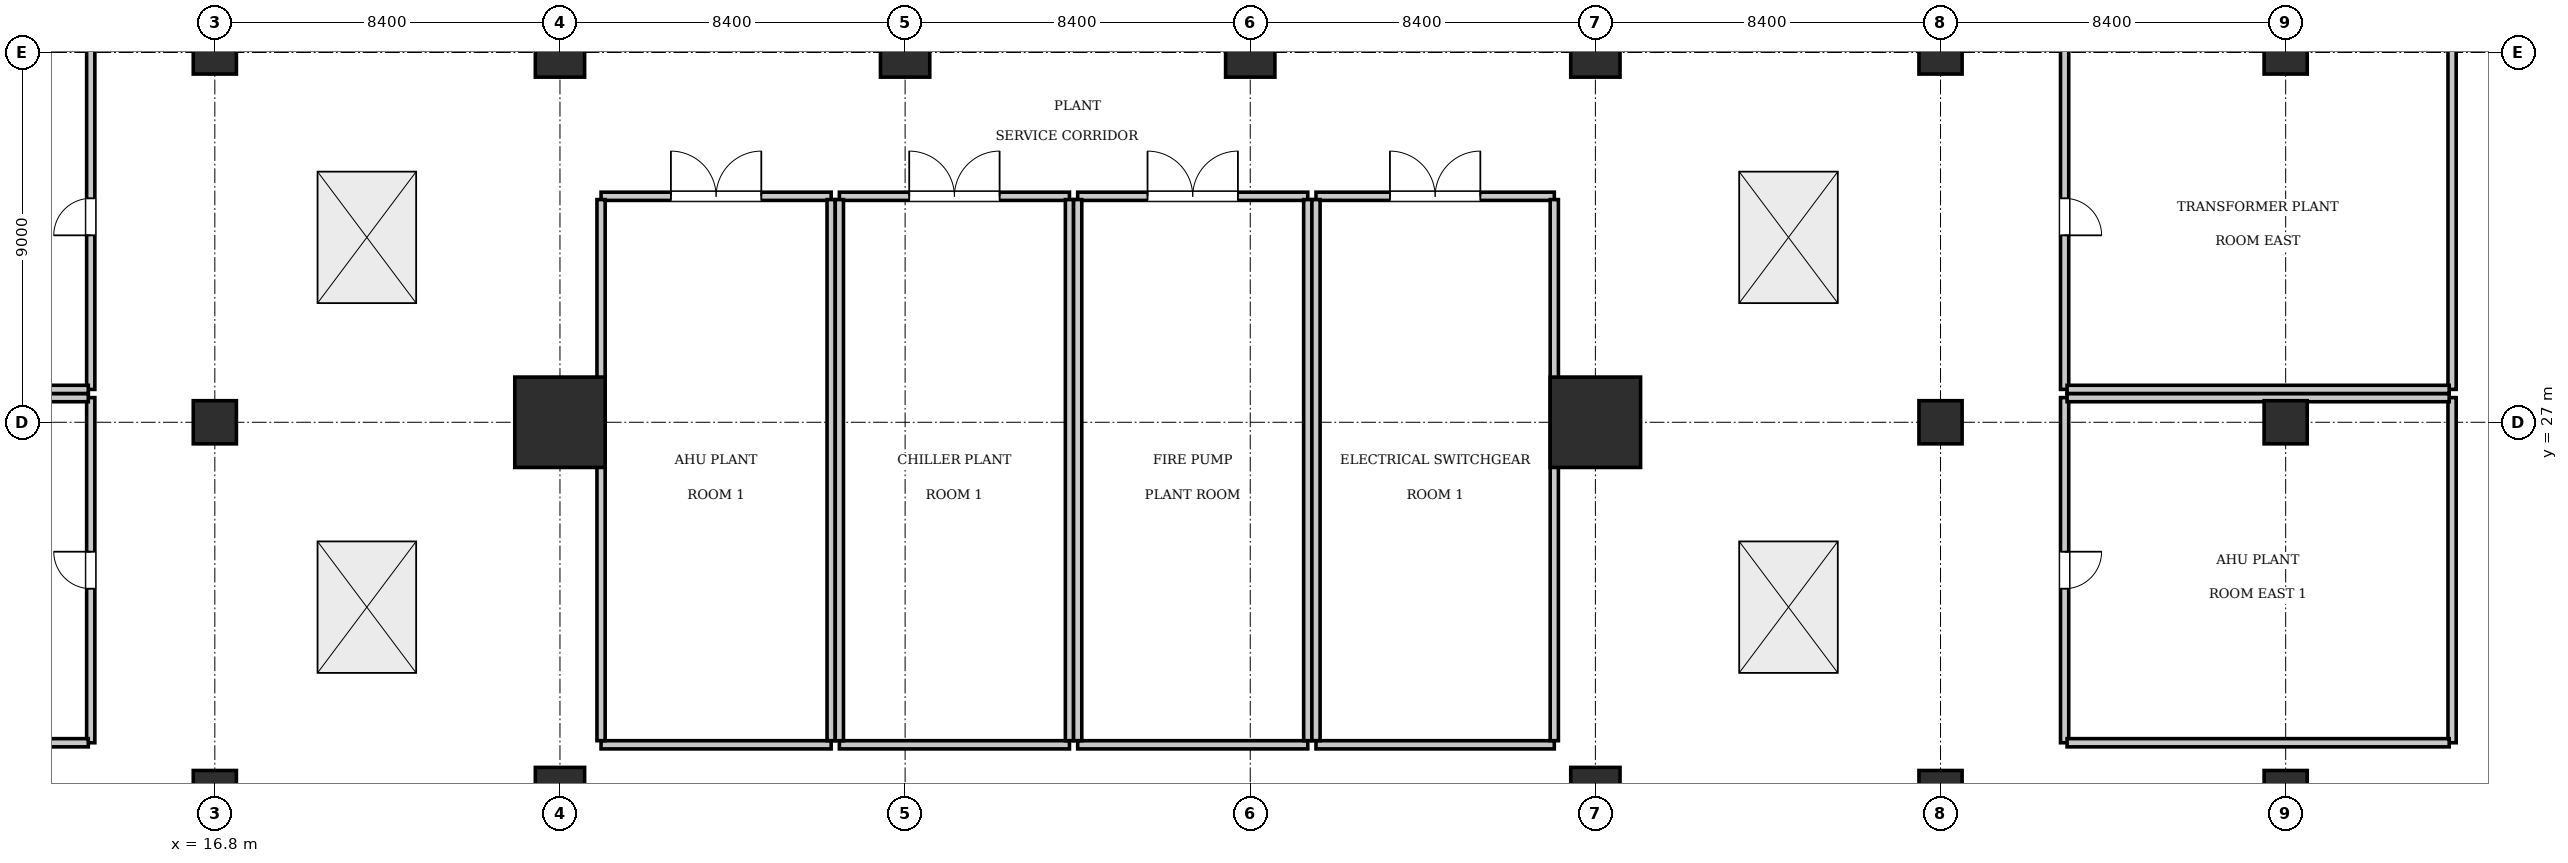
"""IFC4 building model, lengths in metres.
Left out: names, types, materials, properties, quantities, classifications, styles, units other than length and angle.
Written with IfcOpenShell. Run it as: python <this file> out.ifc"""

import sys

from ifc_helpers import new_model, si_unit, direction, frame, frame_2d, origin, origin_2d, place, context, subcontext, project, spatial, rectangle, extrude, element, fill, save


model = new_model("IFC4")
c1 = context("Model", 3, precision=1e-05, world=origin(), true_north=direction((0.0, 1.0)))
c2 = subcontext(c1, "Body", "Model", "MODEL_VIEW")
j1 = project(units=[si_unit("LENGTHUNIT", "METRE"), si_unit("PLANEANGLEUNIT", "RADIAN")], contexts=[c1])
p1 = place(None, origin())
s1 = spatial("IfcSite", under=j1, at=p1, CompositionType="ELEMENT")
p2 = place(p1, origin())
s2 = spatial("IfcBuilding", under=s1, at=p2, CompositionType="ELEMENT")
p3 = place(p2, frame((0.0, 0.0, 21.35)))
s3 = spatial("IfcBuildingStorey", under=s2, at=p3, CompositionType="ELEMENT", Elevation=21.35)
for number, where, z_axis, x_axis in (
    (1, (25.2, 27.0, 0.0), (0.0, 0.0, 1.0), (1.0, 0.0, 0.0)),
    (2, (50.4, 27.0, 0.0), (0.0, 0.0, 1.0), (1.0, 0.0, 0.0)),
):
    element("IfcColumn", number, at=place(p3, frame(where, z_axis=z_axis, x_axis=x_axis)), inside=s3, PredefinedType="COLUMN", context=c2, shape_type="SweptSolid", body=[
        extrude(rectangle(XDim=2.2, YDim=2.2, at=origin_2d()), origin(), (0.0, 0.0, 1.0), 5.6),
    ])
for number, where, z_axis, x_axis in (
    (3, (25.2, 36.0, 0.0), (0.0, 0.0, 1.0), (1.0, 0.0, 0.0)),
    (4, (33.6, 36.0, 0.0), (0.0, 0.0, 1.0), (1.0, 0.0, 0.0)),
    (5, (42.0, 36.0, 0.0), (0.0, 0.0, 1.0), (1.0, 0.0, 0.0)),
    (6, (50.4, 36.0, 0.0), (0.0, 0.0, 1.0), (1.0, 0.0, 0.0)),
    (7, (25.2, 18.0, 0.0), (0.0, 0.0, 1.0), (1.0, 0.0, 0.0)),
    (8, (50.4, 18.0, 0.0), (0.0, 0.0, 1.0), (1.0, 0.0, 0.0)),
):
    element("IfcColumn", number, at=place(p3, frame(where, z_axis=z_axis, x_axis=x_axis)), inside=s3, PredefinedType="COLUMN", context=c2, shape_type="SweptSolid", body=[
        extrude(rectangle(XDim=1.2, YDim=1.2, at=origin_2d()), origin(), (0.0, 0.0, 1.0), 5.6),
    ])
for number, where, z_axis, x_axis in (
    (9, (16.8, 18.0, 0.0), (0.0, 0.0, 1.0), (1.0, 0.0, 0.0)),
    (10, (58.8, 18.0, 0.0), (0.0, 0.0, 1.0), (1.0, 0.0, 0.0)),
    (11, (16.8, 27.0, 0.0), (0.0, 0.0, 1.0), (1.0, 0.0, 0.0)),
    (12, (58.8, 27.0, 0.0), (0.0, 0.0, 1.0), (1.0, 0.0, 0.0)),
    (13, (16.8, 36.0, 0.0), (0.0, 0.0, 1.0), (1.0, 0.0, 0.0)),
    (14, (58.8, 36.0, 0.0), (0.0, 0.0, 1.0), (1.0, 0.0, 0.0)),
    (15, (67.2, 18.0, 0.0), (0.0, 0.0, 1.0), (1.0, 0.0, 0.0)),
    (16, (67.2, 27.0, 0.0), (0.0, 0.0, 1.0), (1.0, 0.0, 0.0)),
    (17, (67.2, 36.0, 0.0), (0.0, 0.0, 1.0), (1.0, 0.0, 0.0)),
):
    element("IfcColumn", number, at=place(p3, frame(where, z_axis=z_axis, x_axis=x_axis)), inside=s3, PredefinedType="COLUMN", context=c2, shape_type="SweptSolid", body=[
        extrude(rectangle(XDim=1.05, YDim=1.05, at=origin_2d()), origin(), (0.0, 0.0, 1.0), 5.6),
    ])
p4 = place(p3, frame((26.2, 32.5, 0.0), z_axis=(0.0, 0.0, 1.0), x_axis=(1.0, 0.0, 0.0)))
e18 = element("IfcWall", 18, at=p4, inside=s3, PredefinedType="PARTITIONING", context=c2, shape_type="SweptSolid", body=[
    extrude(rectangle(XDim=5.6, YDim=0.2, at=frame_2d((2.8, 0.0))), origin(), (0.0, 0.0, 1.0), 5.36),
])
p5 = place(p4, frame((1.7, 0.0, 0.0)))
e19 = element("IfcOpeningElement", 19, at=p5, cuts=e18, PredefinedType="OPENING", context=c2, shape_type="SweptSolid", body=[
    extrude(rectangle(XDim=2.2, YDim=2.4, at=frame_2d((1.1, 1.2))), frame((0.0, 0.11, 0.0), z_axis=(0.0, -1.0, 0.0), x_axis=(1.0, 0.0, 0.0)), (0.0, 0.0, 1.0), 0.22),
])
p6 = place(p3, frame((26.2, 19.15, 0.0), z_axis=(0.0, 0.0, 1.0), x_axis=(1.0, 0.0, 0.0)))
e20 = element("IfcWall", 20, at=p6, inside=s3, PredefinedType="PARTITIONING", context=c2, shape_type="SweptSolid", body=[
    extrude(rectangle(XDim=5.6, YDim=0.2, at=frame_2d((2.8, 0.0))), origin(), (0.0, 0.0, 1.0), 5.36),
])
for number, where, z_axis, x_axis in (
    (21, (26.2, 19.25, 0.0), (0.0, 0.0, 1.0), (0.0, 1.0, 0.0)),
    (22, (31.8, 19.25, 0.0), (0.0, 0.0, 1.0), (0.0, 1.0, 0.0)),
):
    element("IfcWall", number, at=place(p3, frame(where, z_axis=z_axis, x_axis=x_axis)), inside=s3, PredefinedType="PARTITIONING", context=c2, shape_type="SweptSolid", body=[
        extrude(rectangle(XDim=13.17, YDim=0.2, at=frame_2d((6.585, 0.0))), origin(), (0.0, 0.0, 1.0), 5.36),
    ])
p7 = place(p3, frame((32.0, 32.5, 0.0), z_axis=(0.0, 0.0, 1.0), x_axis=(1.0, 0.0, 0.0)))
e23 = element("IfcWall", 23, at=p7, inside=s3, PredefinedType="PARTITIONING", context=c2, shape_type="SweptSolid", body=[
    extrude(rectangle(XDim=5.6, YDim=0.2, at=frame_2d((2.8, 0.0))), origin(), (0.0, 0.0, 1.0), 5.36),
])
p8 = place(p7, frame((1.7, 0.0, 0.0)))
e24 = element("IfcOpeningElement", 24, at=p8, cuts=e23, PredefinedType="OPENING", context=c2, shape_type="SweptSolid", body=[
    extrude(rectangle(XDim=2.2, YDim=2.4, at=frame_2d((1.1, 1.2))), frame((0.0, 0.11, 0.0), z_axis=(0.0, -1.0, 0.0), x_axis=(1.0, 0.0, 0.0)), (0.0, 0.0, 1.0), 0.22),
])
p9 = place(p3, frame((32.0, 19.15, 0.0), z_axis=(0.0, 0.0, 1.0), x_axis=(1.0, 0.0, 0.0)))
e25 = element("IfcWall", 25, at=p9, inside=s3, PredefinedType="PARTITIONING", context=c2, shape_type="SweptSolid", body=[
    extrude(rectangle(XDim=5.6, YDim=0.2, at=frame_2d((2.8, 0.0))), origin(), (0.0, 0.0, 1.0), 5.36),
])
for number, where, z_axis, x_axis in (
    (26, (32.0, 19.25, 0.0), (0.0, 0.0, 1.0), (0.0, 1.0, 0.0)),
    (27, (37.6, 19.25, 0.0), (0.0, 0.0, 1.0), (0.0, 1.0, 0.0)),
):
    element("IfcWall", number, at=place(p3, frame(where, z_axis=z_axis, x_axis=x_axis)), inside=s3, PredefinedType="PARTITIONING", context=c2, shape_type="SweptSolid", body=[
        extrude(rectangle(XDim=13.17, YDim=0.2, at=frame_2d((6.585, 0.0))), origin(), (0.0, 0.0, 1.0), 5.36),
    ])
p10 = place(p3, frame((37.8, 32.5, 0.0), z_axis=(0.0, 0.0, 1.0), x_axis=(1.0, 0.0, 0.0)))
e28 = element("IfcWall", 28, at=p10, inside=s3, PredefinedType="PARTITIONING", context=c2, shape_type="SweptSolid", body=[
    extrude(rectangle(XDim=5.6, YDim=0.2, at=frame_2d((2.8, 0.0))), origin(), (0.0, 0.0, 1.0), 5.36),
])
p11 = place(p10, frame((1.7, 0.0, 0.0)))
e29 = element("IfcOpeningElement", 29, at=p11, cuts=e28, PredefinedType="OPENING", context=c2, shape_type="SweptSolid", body=[
    extrude(rectangle(XDim=2.2, YDim=2.4, at=frame_2d((1.1, 1.2))), frame((0.0, 0.11, 0.0), z_axis=(0.0, -1.0, 0.0), x_axis=(1.0, 0.0, 0.0)), (0.0, 0.0, 1.0), 0.22),
])
p12 = place(p3, frame((37.8, 19.15, 0.0), z_axis=(0.0, 0.0, 1.0), x_axis=(1.0, 0.0, 0.0)))
e30 = element("IfcWall", 30, at=p12, inside=s3, PredefinedType="PARTITIONING", context=c2, shape_type="SweptSolid", body=[
    extrude(rectangle(XDim=5.6, YDim=0.2, at=frame_2d((2.8, 0.0))), origin(), (0.0, 0.0, 1.0), 5.36),
])
for number, where, z_axis, x_axis in (
    (31, (37.8, 19.25, 0.0), (0.0, 0.0, 1.0), (0.0, 1.0, 0.0)),
    (32, (43.4, 19.25, 0.0), (0.0, 0.0, 1.0), (0.0, 1.0, 0.0)),
):
    element("IfcWall", number, at=place(p3, frame(where, z_axis=z_axis, x_axis=x_axis)), inside=s3, PredefinedType="PARTITIONING", context=c2, shape_type="SweptSolid", body=[
        extrude(rectangle(XDim=13.17, YDim=0.2, at=frame_2d((6.585, 0.0))), origin(), (0.0, 0.0, 1.0), 5.36),
    ])
p13 = place(p3, frame((43.6, 32.5, 0.0), z_axis=(0.0, 0.0, 1.0), x_axis=(1.0, 0.0, 0.0)))
e33 = element("IfcWall", 33, at=p13, inside=s3, PredefinedType="PARTITIONING", context=c2, shape_type="SweptSolid", body=[
    extrude(rectangle(XDim=5.8, YDim=0.2, at=frame_2d((2.9, 0.0))), origin(), (0.0, 0.0, 1.0), 5.36),
])
p14 = place(p13, frame((1.8, 0.0, 0.0)))
e34 = element("IfcOpeningElement", 34, at=p14, cuts=e33, PredefinedType="OPENING", context=c2, shape_type="SweptSolid", body=[
    extrude(rectangle(XDim=2.2, YDim=2.4, at=frame_2d((1.1, 1.2))), frame((0.0, 0.11, 0.0), z_axis=(0.0, -1.0, 0.0), x_axis=(1.0, 0.0, 0.0)), (0.0, 0.0, 1.0), 0.22),
])
p15 = place(p3, frame((43.6, 19.15, 0.0), z_axis=(0.0, 0.0, 1.0), x_axis=(1.0, 0.0, 0.0)))
e35 = element("IfcWall", 35, at=p15, inside=s3, PredefinedType="PARTITIONING", context=c2, shape_type="SweptSolid", body=[
    extrude(rectangle(XDim=5.8, YDim=0.2, at=frame_2d((2.9, 0.0))), origin(), (0.0, 0.0, 1.0), 5.36),
])
for number, where, z_axis, x_axis in (
    (36, (43.6, 19.25, 0.0), (0.0, 0.0, 1.0), (0.0, 1.0, 0.0)),
    (37, (49.4, 19.25, 0.0), (0.0, 0.0, 1.0), (0.0, 1.0, 0.0)),
):
    element("IfcWall", number, at=place(p3, frame(where, z_axis=z_axis, x_axis=x_axis)), inside=s3, PredefinedType="PARTITIONING", context=c2, shape_type="SweptSolid", body=[
        extrude(rectangle(XDim=13.17, YDim=0.2, at=frame_2d((6.585, 0.0))), origin(), (0.0, 0.0, 1.0), 5.36),
    ])
p16 = place(p3, frame((13.78, 19.2, 0.0), z_axis=(0.0, 0.0, 1.0), x_axis=(0.0, 1.0, 0.0)))
e38 = element("IfcWall", 38, at=p16, inside=s3, PredefinedType="PARTITIONING", context=c2, shape_type="SweptSolid", body=[
    extrude(rectangle(XDim=8.4, YDim=0.2, at=frame_2d((4.2, 0.0))), origin(), (0.0, 0.0, 1.0), 5.36),
])
p17 = place(p16, frame((3.75, 0.0, 0.0)))
e39 = element("IfcOpeningElement", 39, at=p17, cuts=e38, PredefinedType="OPENING", context=c2, shape_type="SweptSolid", body=[
    extrude(rectangle(XDim=0.9, YDim=2.1, at=frame_2d((0.45, 1.05))), frame((0.0, 0.11, 0.0), z_axis=(0.0, -1.0, 0.0), x_axis=(1.0, 0.0, 0.0)), (0.0, 0.0, 1.0), 0.22),
])
for number, where, z_axis, x_axis in (
    (40, (4.42, 19.2, 0.0), (0.0, 0.0, 1.0), (1.0, 0.0, 0.0)),
    (41, (4.42, 27.6, 0.0), (0.0, 0.0, 1.0), (1.0, 0.0, 0.0)),
):
    element("IfcWall", number, at=place(p3, frame(where, z_axis=z_axis, x_axis=x_axis)), inside=s3, PredefinedType="PARTITIONING", context=c2, shape_type="SweptSolid", body=[
        extrude(rectangle(XDim=9.3, YDim=0.2, at=frame_2d((4.65, 0.0))), origin(), (0.0, 0.0, 1.0), 5.36),
    ])
p18 = place(p3, frame((13.78, 27.8, 0.0), z_axis=(0.0, 0.0, 1.0), x_axis=(0.0, 1.0, 0.0)))
e42 = element("IfcWall", 42, at=p18, inside=s3, PredefinedType="PARTITIONING", context=c2, shape_type="SweptSolid", body=[
    extrude(rectangle(XDim=8.4, YDim=0.2, at=frame_2d((4.2, 0.0))), origin(), (0.0, 0.0, 1.0), 5.36),
])
p19 = place(p18, frame((3.75, 0.0, 0.0)))
e43 = element("IfcOpeningElement", 43, at=p19, cuts=e42, PredefinedType="OPENING", context=c2, shape_type="SweptSolid", body=[
    extrude(rectangle(XDim=0.9, YDim=2.1, at=frame_2d((0.45, 1.05))), frame((0.0, 0.11, 0.0), z_axis=(0.0, -1.0, 0.0), x_axis=(1.0, 0.0, 0.0)), (0.0, 0.0, 1.0), 0.22),
])
p20 = place(p3, frame((4.42, 27.8, 0.0), z_axis=(0.0, 0.0, 1.0), x_axis=(1.0, 0.0, 0.0)))
e44 = element("IfcWall", 44, at=p20, inside=s3, PredefinedType="PARTITIONING", context=c2, shape_type="SweptSolid", body=[
    extrude(rectangle(XDim=9.3, YDim=0.2, at=frame_2d((4.65, 0.0))), origin(), (0.0, 0.0, 1.0), 5.36),
])
p21 = place(p3, frame((61.82, 19.2, 0.0), z_axis=(0.0, 0.0, 1.0), x_axis=(0.0, 1.0, 0.0)))
e45 = element("IfcWall", 45, at=p21, inside=s3, PredefinedType="PARTITIONING", context=c2, shape_type="SweptSolid", body=[
    extrude(rectangle(XDim=8.4, YDim=0.2, at=frame_2d((4.2, 0.0))), origin(), (0.0, 0.0, 1.0), 5.36),
])
p22 = place(p21, frame((3.75, 0.0, 0.0)))
e46 = element("IfcOpeningElement", 46, at=p22, cuts=e45, PredefinedType="OPENING", context=c2, shape_type="SweptSolid", body=[
    extrude(rectangle(XDim=0.9, YDim=2.1, at=frame_2d((0.45, 1.05))), frame((0.0, 0.11, 0.0), z_axis=(0.0, -1.0, 0.0), x_axis=(1.0, 0.0, 0.0)), (0.0, 0.0, 1.0), 0.22),
])
p23 = place(p3, frame((71.25, 19.2, 0.0), z_axis=(0.0, 0.0, 1.0), x_axis=(0.0, 1.0, 0.0)))
e47 = element("IfcWall", 47, at=p23, inside=s3, PredefinedType="PARTITIONING", context=c2, shape_type="SweptSolid", body=[
    extrude(rectangle(XDim=8.4, YDim=0.2, at=frame_2d((4.2, 0.0))), origin(), (0.0, 0.0, 1.0), 5.36),
])
for number, where, z_axis, x_axis in (
    (48, (61.88, 19.2, 0.0), (0.0, 0.0, 1.0), (1.0, 0.0, 0.0)),
    (49, (61.88, 27.6, 0.0), (0.0, 0.0, 1.0), (1.0, 0.0, 0.0)),
):
    element("IfcWall", number, at=place(p3, frame(where, z_axis=z_axis, x_axis=x_axis)), inside=s3, PredefinedType="PARTITIONING", context=c2, shape_type="SweptSolid", body=[
        extrude(rectangle(XDim=9.3, YDim=0.2, at=frame_2d((4.65, 0.0))), origin(), (0.0, 0.0, 1.0), 5.36),
    ])
p24 = place(p3, frame((61.82, 27.8, 0.0), z_axis=(0.0, 0.0, 1.0), x_axis=(0.0, 1.0, 0.0)))
e50 = element("IfcWall", 50, at=p24, inside=s3, PredefinedType="PARTITIONING", context=c2, shape_type="SweptSolid", body=[
    extrude(rectangle(XDim=8.4, YDim=0.2, at=frame_2d((4.2, 0.0))), origin(), (0.0, 0.0, 1.0), 5.36),
])
p25 = place(p24, frame((3.75, 0.0, 0.0)))
e51 = element("IfcOpeningElement", 51, at=p25, cuts=e50, PredefinedType="OPENING", context=c2, shape_type="SweptSolid", body=[
    extrude(rectangle(XDim=0.9, YDim=2.1, at=frame_2d((0.45, 1.05))), frame((0.0, 0.11, 0.0), z_axis=(0.0, -1.0, 0.0), x_axis=(1.0, 0.0, 0.0)), (0.0, 0.0, 1.0), 0.22),
])
p26 = place(p3, frame((71.25, 27.8, 0.0), z_axis=(0.0, 0.0, 1.0), x_axis=(0.0, 1.0, 0.0)))
e52 = element("IfcWall", 52, at=p26, inside=s3, PredefinedType="PARTITIONING", context=c2, shape_type="SweptSolid", body=[
    extrude(rectangle(XDim=8.4, YDim=0.2, at=frame_2d((4.2, 0.0))), origin(), (0.0, 0.0, 1.0), 5.36),
])
p27 = place(p3, frame((61.88, 27.8, 0.0), z_axis=(0.0, 0.0, 1.0), x_axis=(1.0, 0.0, 0.0)))
e53 = element("IfcWall", 53, at=p27, inside=s3, PredefinedType="PARTITIONING", context=c2, shape_type="SweptSolid", body=[
    extrude(rectangle(XDim=9.3, YDim=0.2, at=frame_2d((4.65, 0.0))), origin(), (0.0, 0.0, 1.0), 5.36),
])
p28 = place(p3, frame((0.0, 0.0, -0.28)))
p29 = place(p28, frame((20.5, 22.5, 0.0)))
p30 = place(p29, frame((0.0, 0.0, 0.23)))
e54 = element("IfcWindow", 54, at=p30, inside=s3, PartitioningType="SINGLE_PANEL", PredefinedType="SKYLIGHT", context=c2, shape_type="SweptSolid", body=[
    extrude(rectangle(XDim=2.4, YDim=3.2, at=origin_2d()), origin(), (0.0, 0.0, 1.0), 0.05),
])
p31 = place(p28, frame((20.5, 31.5, 0.0)))
p32 = place(p31, frame((0.0, 0.0, 0.23)))
e55 = element("IfcWindow", 55, at=p32, inside=s3, PartitioningType="SINGLE_PANEL", PredefinedType="SKYLIGHT", context=c2, shape_type="SweptSolid", body=[
    extrude(rectangle(XDim=2.4, YDim=3.2, at=origin_2d()), origin(), (0.0, 0.0, 1.0), 0.05),
])
p33 = place(p28, frame((55.1, 22.5, 0.0)))
p34 = place(p33, frame((0.0, 0.0, 0.23)))
e56 = element("IfcWindow", 56, at=p34, inside=s3, PartitioningType="SINGLE_PANEL", PredefinedType="SKYLIGHT", context=c2, shape_type="SweptSolid", body=[
    extrude(rectangle(XDim=2.4, YDim=3.2, at=origin_2d()), origin(), (0.0, 0.0, 1.0), 0.05),
])
p35 = place(p28, frame((55.1, 31.5, 0.0)))
p36 = place(p35, frame((0.0, 0.0, 0.23)))
e57 = element("IfcWindow", 57, at=p36, inside=s3, PartitioningType="SINGLE_PANEL", PredefinedType="SKYLIGHT", context=c2, shape_type="SweptSolid", body=[
    extrude(rectangle(XDim=2.4, YDim=3.2, at=origin_2d()), origin(), (0.0, 0.0, 1.0), 0.05),
])
p37 = place(p5, origin())
e58 = element("IfcDoor", 58, at=p37, inside=s3, OperationType="DOUBLE_DOOR_SINGLE_SWING", PredefinedType="GATE", context=c2, shape_type="SweptSolid", body=[
    extrude(rectangle(XDim=2.2, YDim=2.4, at=frame_2d((1.1, 1.2))), frame((0.0, 0.025, 0.0), z_axis=(0.0, -1.0, 0.0), x_axis=(1.0, 0.0, 0.0)), (0.0, 0.0, 1.0), 0.05),
])
fill(e19, e58)
p38 = place(p8, origin())
e59 = element("IfcDoor", 59, at=p38, inside=s3, OperationType="DOUBLE_DOOR_SINGLE_SWING", PredefinedType="GATE", context=c2, shape_type="SweptSolid", body=[
    extrude(rectangle(XDim=2.2, YDim=2.4, at=frame_2d((1.1, 1.2))), frame((0.0, 0.025, 0.0), z_axis=(0.0, -1.0, 0.0), x_axis=(1.0, 0.0, 0.0)), (0.0, 0.0, 1.0), 0.05),
])
fill(e24, e59)
p39 = place(p11, origin())
e60 = element("IfcDoor", 60, at=p39, inside=s3, OperationType="DOUBLE_DOOR_SINGLE_SWING", PredefinedType="GATE", context=c2, shape_type="SweptSolid", body=[
    extrude(rectangle(XDim=2.2, YDim=2.4, at=frame_2d((1.1, 1.2))), frame((0.0, 0.025, 0.0), z_axis=(0.0, -1.0, 0.0), x_axis=(1.0, 0.0, 0.0)), (0.0, 0.0, 1.0), 0.05),
])
fill(e29, e60)
p40 = place(p14, origin())
e61 = element("IfcDoor", 61, at=p40, inside=s3, OperationType="DOUBLE_DOOR_SINGLE_SWING", PredefinedType="GATE", context=c2, shape_type="SweptSolid", body=[
    extrude(rectangle(XDim=2.2, YDim=2.4, at=frame_2d((1.1, 1.2))), frame((0.0, 0.025, 0.0), z_axis=(0.0, -1.0, 0.0), x_axis=(1.0, 0.0, 0.0)), (0.0, 0.0, 1.0), 0.05),
])
fill(e34, e61)
p41 = place(p17, origin())
e62 = element("IfcDoor", 62, at=p41, inside=s3, OperationType="SINGLE_SWING_RIGHT", PredefinedType="DOOR", context=c2, shape_type="SweptSolid", body=[
    extrude(rectangle(XDim=0.9, YDim=2.1, at=frame_2d((0.45, 1.05))), frame((0.0, 0.025, 0.0), z_axis=(0.0, -1.0, 0.0), x_axis=(1.0, 0.0, 0.0)), (0.0, 0.0, 1.0), 0.05),
])
fill(e39, e62)
p42 = place(p19, origin())
e63 = element("IfcDoor", 63, at=p42, inside=s3, OperationType="SINGLE_SWING_LEFT", PredefinedType="DOOR", context=c2, shape_type="SweptSolid", body=[
    extrude(rectangle(XDim=0.9, YDim=2.1, at=frame_2d((0.45, 1.05))), frame((0.0, 0.025, 0.0), z_axis=(0.0, -1.0, 0.0), x_axis=(1.0, 0.0, 0.0)), (0.0, 0.0, 1.0), 0.05),
])
fill(e43, e63)
p43 = place(p22, frame((0.9, 0.0, 0.0), z_axis=(0.0, 0.0, 1.0), x_axis=(-1.0, 0.0, 0.0)))
e64 = element("IfcDoor", 64, at=p43, inside=s3, OperationType="SINGLE_SWING_LEFT", PredefinedType="DOOR", context=c2, shape_type="SweptSolid", body=[
    extrude(rectangle(XDim=0.9, YDim=2.1, at=frame_2d((0.45, 1.05))), frame((0.0, 0.025, 0.0), z_axis=(0.0, -1.0, 0.0), x_axis=(1.0, 0.0, 0.0)), (0.0, 0.0, 1.0), 0.05),
])
fill(e46, e64)
p44 = place(p25, frame((0.9, 0.0, 0.0), z_axis=(0.0, 0.0, 1.0), x_axis=(-1.0, 0.0, 0.0)))
e65 = element("IfcDoor", 65, at=p44, inside=s3, OperationType="SINGLE_SWING_RIGHT", PredefinedType="DOOR", context=c2, shape_type="SweptSolid", body=[
    extrude(rectangle(XDim=0.9, YDim=2.1, at=frame_2d((0.45, 1.05))), frame((0.0, 0.025, 0.0), z_axis=(0.0, -1.0, 0.0), x_axis=(1.0, 0.0, 0.0)), (0.0, 0.0, 1.0), 0.05),
])
fill(e51, e65)
save(model, sys.argv[1])
